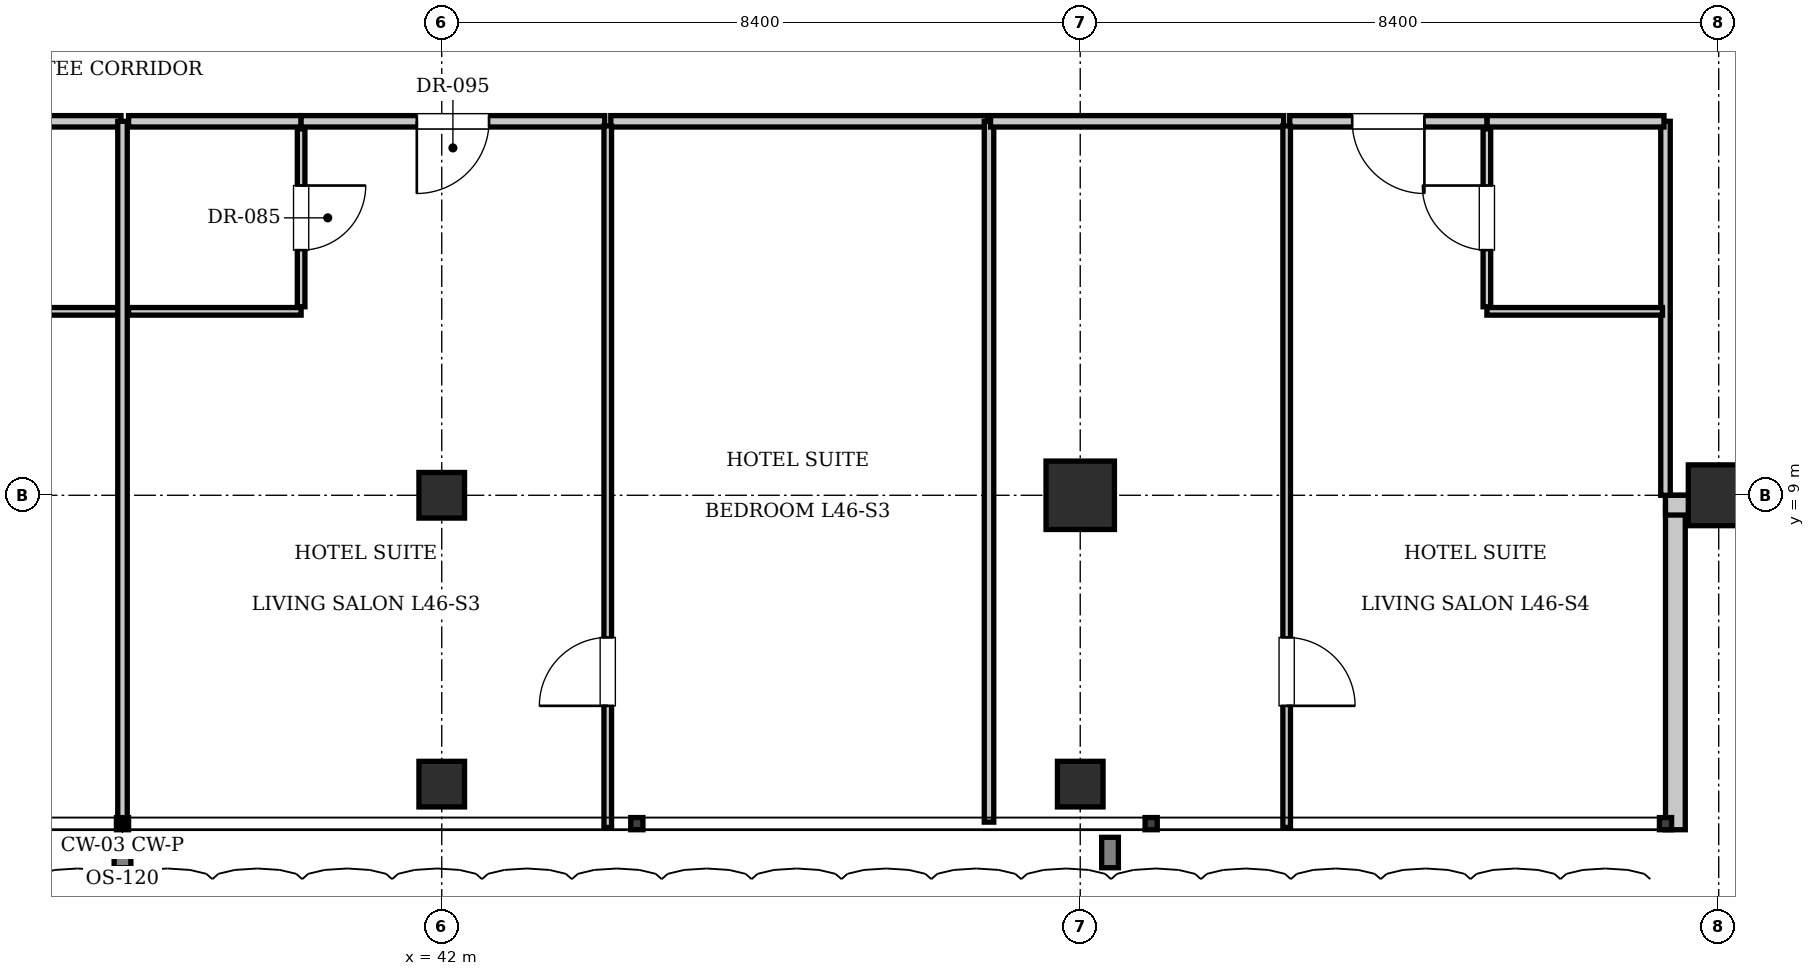
"""IFC4 building model, lengths in metres.
Left out: names, types, materials, properties, quantities, classifications, styles, units other than length and angle.
Written with IfcOpenShell. Run it as: python <this file> out.ifc"""

import sys

from ifc_helpers import new_model, si_unit, direction, frame, frame_2d, origin, origin_2d, place, context, subcontext, project, spatial, rectangle, i_section, extrude, element, fill, save


model = new_model("IFC4")
c1 = context("Model", 3, precision=1e-05, world=origin(), true_north=direction((0.0, 1.0)))
c2 = subcontext(c1, "Body", "Model", "MODEL_VIEW")
j1 = project(units=[si_unit("LENGTHUNIT", "METRE"), si_unit("PLANEANGLEUNIT", "RADIAN")], contexts=[c1])
p1 = place(None, origin())
s1 = spatial("IfcSite", under=j1, at=p1, CompositionType="ELEMENT")
p2 = place(p1, origin())
s2 = spatial("IfcBuilding", under=s1, at=p2, CompositionType="ELEMENT")
p3 = place(p2, frame((0.0, 0.0, 189.0)))
s3 = spatial("IfcBuildingStorey", under=s2, at=p3, CompositionType="ELEMENT", Elevation=189.0)
p4 = place(p3, frame((50.4, 9.0, 0.0), z_axis=(0.0, 0.0, 1.0), x_axis=(1.0, 0.0, 0.0)))
e1 = element("IfcColumn", 1, at=p4, inside=s3, PredefinedType="COLUMN", context=c2, shape_type="SweptSolid", body=[
    extrude(rectangle(XDim=0.9, YDim=0.9, at=origin_2d()), origin(), (0.0, 0.0, 1.0), 3.85),
])
p5 = place(p3, frame((42.0, 9.0, 0.0), z_axis=(0.0, 0.0, 1.0), x_axis=(1.0, 0.0, 0.0)))
e2 = element("IfcColumn", 2, at=p5, inside=s3, PredefinedType="COLUMN", context=c2, shape_type="SweptSolid", body=[
    extrude(i_section(OverallWidth=0.6, OverallDepth=0.6, WebThickness=0.025, FlangeThickness=0.038, at=origin_2d()), origin(), (0.0, 0.0, 1.0), 3.85),
])
p6 = place(p3, frame((58.8, 9.0, 0.0), z_axis=(0.0, 0.0, 1.0), x_axis=(1.0, 0.0, 0.0)))
e3 = element("IfcColumn", 3, at=p6, inside=s3, PredefinedType="COLUMN", context=c2, shape_type="SweptSolid", body=[
    extrude(rectangle(XDim=0.8, YDim=0.8, at=origin_2d()), origin(), (0.0, 0.0, 1.0), 3.85),
])
for number, where, z_axis, x_axis in (
    (4, (42.0, 5.2, 0.0), (0.0, 0.0, 1.0), (1.0, 0.0, 0.0)),
    (5, (50.4, 5.2, 0.0), (0.0, 0.0, 1.0), (1.0, 0.0, 0.0)),
):
    element("IfcColumn", number, at=place(p3, frame(where, z_axis=z_axis, x_axis=x_axis)), inside=s3, PredefinedType="COLUMN", context=c2, shape_type="SweptSolid", body=[
        extrude(i_section(OverallWidth=0.6, OverallDepth=0.6, WebThickness=0.025, FlangeThickness=0.038, at=origin_2d()), origin(), (0.0, 0.0, 1.0), 3.85),
    ])
p7 = place(p3, frame((58.23, 9.0, 0.0), z_axis=(0.0, 0.0, 1.0), x_axis=(0.0, -1.0, 0.0)))
e6 = element("IfcWall", 6, at=p7, inside=s3, PredefinedType="SOLIDWALL", context=c2, shape_type="SweptSolid", body=[
    extrude(rectangle(XDim=4.4, YDim=0.26, at=frame_2d((2.2, 0.0))), origin(), (0.0, 0.0, 1.0), 3.61),
])
p8 = place(p3, frame((62.5, 8.87, 0.0), z_axis=(0.0, 0.0, 1.0), x_axis=(-1.0, 0.0, 0.0)))
e7 = element("IfcWall", 7, at=p8, inside=s3, PredefinedType="SOLIDWALL", context=c2, shape_type="SweptSolid", body=[
    extrude(rectangle(XDim=4.4, YDim=0.26, at=frame_2d((2.2, 0.0))), origin(), (0.0, 0.0, 1.0), 3.007),
])
p9 = place(p3, frame((58.1, 9.0, 0.0), z_axis=(0.0, 0.0, 1.0), x_axis=(0.0, 1.0, 0.0)))
e8 = element("IfcWall", 8, at=p9, inside=s3, PredefinedType="PARTITIONING", context=c2, shape_type="SweptSolid", body=[
    extrude(rectangle(XDim=4.92, YDim=0.125, at=frame_2d((2.46, 0.0))), origin(), (0.0, 0.0, 1.0), 3.61),
])
p10 = place(p3, frame((35.45, 13.92, 0.0), z_axis=(0.0, 0.0, 1.0), x_axis=(1.0, 0.0, 0.0)))
e9 = element("IfcWall", 9, at=p10, inside=s3, PredefinedType="PARTITIONING", context=c2, shape_type="SweptSolid", body=[
    extrude(rectangle(XDim=2.33, YDim=0.15, at=frame_2d((1.165, 0.0))), origin(), (0.0, 0.0, 1.0), 3.61),
])
p11 = place(p3, frame((35.45, 11.42, 0.0), z_axis=(0.0, 0.0, 1.0), x_axis=(1.0, 0.0, 0.0)))
e10 = element("IfcWall", 10, at=p11, inside=s3, PredefinedType="PARTITIONING", context=c2, shape_type="SweptSolid", body=[
    extrude(rectangle(XDim=2.31, YDim=0.1, at=frame_2d((1.155, 0.0))), origin(), (0.0, 0.0, 1.0), 3.61),
])
p12 = place(p3, frame((37.8, 4.7, 0.0), z_axis=(0.0, 0.0, 1.0), x_axis=(0.0, 1.0, 0.0)))
e11 = element("IfcWall", 11, at=p12, inside=s3, PredefinedType="PARTITIONING", context=c2, shape_type="SweptSolid", body=[
    extrude(rectangle(XDim=9.22, YDim=0.125, at=frame_2d((4.61, 0.0))), origin(), (0.0, 0.0, 1.0), 3.293),
])
p13 = place(p3, frame((37.88, 13.92, 0.0), z_axis=(0.0, 0.0, 1.0), x_axis=(1.0, 0.0, 0.0)))
e12 = element("IfcWall", 12, at=p13, inside=s3, PredefinedType="PARTITIONING", context=c2, shape_type="SweptSolid", body=[
    extrude(rectangle(XDim=2.27, YDim=0.15, at=frame_2d((1.135, 0.0))), origin(), (0.0, 0.0, 1.0), 3.61),
])
p14 = place(p3, frame((37.88, 11.42, 0.0), z_axis=(0.0, 0.0, 1.0), x_axis=(1.0, 0.0, 0.0)))
e13 = element("IfcWall", 13, at=p14, inside=s3, PredefinedType="PARTITIONING", context=c2, shape_type="SweptSolid", body=[
    extrude(rectangle(XDim=2.27, YDim=0.1, at=frame_2d((1.135, 0.0))), origin(), (0.0, 0.0, 1.0), 3.61),
])
p15 = place(p3, frame((40.15, 11.48, 0.0), z_axis=(0.0, 0.0, 1.0), x_axis=(0.0, 1.0, 0.0)))
e14 = element("IfcWall", 14, at=p15, inside=s3, PredefinedType="PARTITIONING", context=c2, shape_type="SweptSolid", body=[
    extrude(rectangle(XDim=2.34, YDim=0.1, at=frame_2d((1.17, 0.0))), origin(), (0.0, 0.0, 1.0), 3.61),
])
p16 = place(p15, frame((0.745, 0.0, 0.0)))
e15 = element("IfcOpeningElement", 15, at=p16, cuts=e14, PredefinedType="OPENING", context=c2, shape_type="SweptSolid", body=[
    extrude(rectangle(XDim=0.85, YDim=2.1, at=frame_2d((0.425, 1.05))), frame((0.0, 0.06, 0.0), z_axis=(0.0, -1.0, 0.0), x_axis=(1.0, 0.0, 0.0)), (0.0, 0.0, 1.0), 0.12),
])
p17 = place(p3, frame((40.15, 13.92, 0.0), z_axis=(0.0, 0.0, 1.0), x_axis=(1.0, 0.0, 0.0)))
e16 = element("IfcWall", 16, at=p17, inside=s3, PredefinedType="PARTITIONING", context=c2, shape_type="SweptSolid", body=[
    extrude(rectangle(XDim=3.994, YDim=0.15, at=frame_2d((1.997, 0.0))), origin(), (0.0, 0.0, 1.0), 3.61),
])
p18 = place(p17, frame((1.522, 0.0, 0.0)))
e17 = element("IfcOpeningElement", 17, at=p18, cuts=e16, PredefinedType="OPENING", context=c2, shape_type="SweptSolid", body=[
    extrude(rectangle(XDim=0.95, YDim=2.15, at=frame_2d((0.475, 1.075))), frame((0.0, 0.085, 0.0), z_axis=(0.0, -1.0, 0.0), x_axis=(1.0, 0.0, 0.0)), (0.0, 0.0, 1.0), 0.17),
])
p19 = place(p3, frame((44.224, 13.92, 0.0), z_axis=(0.0, 0.0, 1.0), x_axis=(1.0, 0.0, 0.0)))
e18 = element("IfcWall", 18, at=p19, inside=s3, PredefinedType="PARTITIONING", context=c2, shape_type="SweptSolid", body=[
    extrude(rectangle(XDim=4.956, YDim=0.15, at=frame_2d((2.478, 0.0))), origin(), (0.0, 0.0, 1.0), 3.61),
])
p20 = place(p3, frame((44.184, 4.63, 0.0), z_axis=(0.0, 0.0, 1.0), x_axis=(0.0, 1.0, 0.0)))
e19 = element("IfcWall", 19, at=p20, inside=s3, PredefinedType="PARTITIONING", context=c2, shape_type="SweptSolid", body=[
    extrude(rectangle(XDim=9.23, YDim=0.1, at=frame_2d((4.615, 0.0))), origin(), (0.0, 0.0, 1.0), 3.61),
])
p21 = place(p20, frame((1.6, 0.0, 0.0)))
e20 = element("IfcOpeningElement", 20, at=p21, cuts=e19, PredefinedType="OPENING", context=c2, shape_type="SweptSolid", body=[
    extrude(rectangle(XDim=0.9, YDim=2.1, at=frame_2d((0.45, 1.05))), frame((0.0, 0.06, 0.0), z_axis=(0.0, -1.0, 0.0), x_axis=(1.0, 0.0, 0.0)), (0.0, 0.0, 1.0), 0.12),
])
p22 = place(p3, frame((49.2, 4.7, 0.0), z_axis=(0.0, 0.0, 1.0), x_axis=(0.0, 1.0, 0.0)))
e21 = element("IfcWall", 21, at=p22, inside=s3, PredefinedType="PARTITIONING", context=c2, shape_type="SweptSolid", body=[
    extrude(rectangle(XDim=9.22, YDim=0.125, at=frame_2d((4.61, 0.0))), origin(), (0.0, 0.0, 1.0), 3.61),
])
p23 = place(p3, frame((55.75, 13.92, 0.0), z_axis=(0.0, 0.0, 1.0), x_axis=(1.0, 0.0, 0.0)))
e22 = element("IfcWall", 22, at=p23, inside=s3, PredefinedType="PARTITIONING", context=c2, shape_type="SweptSolid", body=[
    extrude(rectangle(XDim=2.33, YDim=0.15, at=frame_2d((1.165, 0.0))), origin(), (0.0, 0.0, 1.0), 3.61),
])
p24 = place(p3, frame((55.75, 11.42, 0.0), z_axis=(0.0, 0.0, 1.0), x_axis=(1.0, 0.0, 0.0)))
e23 = element("IfcWall", 23, at=p24, inside=s3, PredefinedType="PARTITIONING", context=c2, shape_type="SweptSolid", body=[
    extrude(rectangle(XDim=2.31, YDim=0.1, at=frame_2d((1.155, 0.0))), origin(), (0.0, 0.0, 1.0), 3.61),
])
p25 = place(p3, frame((55.75, 11.48, 0.0), z_axis=(0.0, 0.0, 1.0), x_axis=(0.0, 1.0, 0.0)))
e24 = element("IfcWall", 24, at=p25, inside=s3, PredefinedType="PARTITIONING", context=c2, shape_type="SweptSolid", body=[
    extrude(rectangle(XDim=2.34, YDim=0.1, at=frame_2d((1.17, 0.0))), origin(), (0.0, 0.0, 1.0), 3.61),
])
p26 = place(p25, frame((0.745, 0.0, 0.0)))
e25 = element("IfcOpeningElement", 25, at=p26, cuts=e24, PredefinedType="OPENING", context=c2, shape_type="SweptSolid", body=[
    extrude(rectangle(XDim=0.85, YDim=2.1, at=frame_2d((0.425, 1.05))), frame((0.0, 0.06, 0.0), z_axis=(0.0, -1.0, 0.0), x_axis=(1.0, 0.0, 0.0)), (0.0, 0.0, 1.0), 0.12),
])
p27 = place(p3, frame((49.22, 13.92, 0.0), z_axis=(0.0, 0.0, 1.0), x_axis=(1.0, 0.0, 0.0)))
e26 = element("IfcWall", 26, at=p27, inside=s3, PredefinedType="PARTITIONING", context=c2, shape_type="SweptSolid", body=[
    extrude(rectangle(XDim=3.856, YDim=0.15, at=frame_2d((1.928, 0.0))), origin(), (0.0, 0.0, 1.0), 3.61),
])
p28 = place(p3, frame((53.156, 13.92, 0.0), z_axis=(0.0, 0.0, 1.0), x_axis=(1.0, 0.0, 0.0)))
e27 = element("IfcWall", 27, at=p28, inside=s3, PredefinedType="PARTITIONING", context=c2, shape_type="SweptSolid", body=[
    extrude(rectangle(XDim=2.594, YDim=0.15, at=frame_2d((1.297, 0.0))), origin(), (0.0, 0.0, 1.0), 3.61),
])
p29 = place(p28, frame((0.822, 0.0, 0.0)))
e28 = element("IfcOpeningElement", 28, at=p29, cuts=e27, PredefinedType="OPENING", context=c2, shape_type="SweptSolid", body=[
    extrude(rectangle(XDim=0.95, YDim=2.15, at=frame_2d((0.475, 1.075))), frame((0.0, 0.085, 0.0), z_axis=(0.0, -1.0, 0.0), x_axis=(1.0, 0.0, 0.0)), (0.0, 0.0, 1.0), 0.17),
])
p30 = place(p3, frame((53.116, 4.63, 0.0), z_axis=(0.0, 0.0, 1.0), x_axis=(0.0, 1.0, 0.0)))
e29 = element("IfcWall", 29, at=p30, inside=s3, PredefinedType="PARTITIONING", context=c2, shape_type="SweptSolid", body=[
    extrude(rectangle(XDim=9.23, YDim=0.1, at=frame_2d((4.615, 0.0))), origin(), (0.0, 0.0, 1.0), 3.61),
])
p31 = place(p30, frame((1.6, 0.0, 0.0)))
e30 = element("IfcOpeningElement", 30, at=p31, cuts=e29, PredefinedType="OPENING", context=c2, shape_type="SweptSolid", body=[
    extrude(rectangle(XDim=0.9, YDim=2.1, at=frame_2d((0.45, 1.05))), frame((0.0, 0.06, 0.0), z_axis=(0.0, -1.0, 0.0), x_axis=(1.0, 0.0, 0.0)), (0.0, 0.0, 1.0), 0.12),
])
p32 = place(p16, frame((0.85, 0.0, 0.0), z_axis=(0.0, 0.0, 1.0), x_axis=(-1.0, 0.0, 0.0)))
e31 = element("IfcDoor", 31, at=p32, inside=s3, OperationType="SINGLE_SWING_LEFT", PredefinedType="DOOR", context=c2, shape_type="SweptSolid", body=[
    extrude(rectangle(XDim=0.85, YDim=2.1, at=frame_2d((0.425, 1.05))), frame((0.0, 0.025, 0.0), z_axis=(0.0, -1.0, 0.0), x_axis=(1.0, 0.0, 0.0)), (0.0, 0.0, 1.0), 0.05),
])
fill(e15, e31)
p33 = place(p18, frame((0.95, 0.0, 0.0), z_axis=(0.0, 0.0, 1.0), x_axis=(-1.0, 0.0, 0.0)))
e32 = element("IfcDoor", 32, at=p33, inside=s3, OperationType="SINGLE_SWING_RIGHT", PredefinedType="DOOR", context=c2, shape_type="SweptSolid", body=[
    extrude(rectangle(XDim=0.95, YDim=2.15, at=frame_2d((0.475, 1.075))), frame((0.0, 0.025, 0.0), z_axis=(0.0, -1.0, 0.0), x_axis=(1.0, 0.0, 0.0)), (0.0, 0.0, 1.0), 0.05),
])
fill(e17, e32)
p34 = place(p21, origin())
e33 = element("IfcDoor", 33, at=p34, inside=s3, OperationType="SINGLE_SWING_LEFT", PredefinedType="DOOR", context=c2, shape_type="SweptSolid", body=[
    extrude(rectangle(XDim=0.9, YDim=2.1, at=frame_2d((0.45, 1.05))), frame((0.0, 0.025, 0.0), z_axis=(0.0, -1.0, 0.0), x_axis=(1.0, 0.0, 0.0)), (0.0, 0.0, 1.0), 0.05),
])
fill(e20, e33)
p35 = place(p26, origin())
e34 = element("IfcDoor", 34, at=p35, inside=s3, OperationType="SINGLE_SWING_RIGHT", PredefinedType="DOOR", context=c2, shape_type="SweptSolid", body=[
    extrude(rectangle(XDim=0.85, YDim=2.1, at=frame_2d((0.425, 1.05))), frame((0.0, 0.025, 0.0), z_axis=(0.0, -1.0, 0.0), x_axis=(1.0, 0.0, 0.0)), (0.0, 0.0, 1.0), 0.05),
])
fill(e25, e34)
p36 = place(p29, frame((0.95, 0.0, 0.0), z_axis=(0.0, 0.0, 1.0), x_axis=(-1.0, 0.0, 0.0)))
e35 = element("IfcDoor", 35, at=p36, inside=s3, OperationType="SINGLE_SWING_LEFT", PredefinedType="DOOR", context=c2, shape_type="SweptSolid", body=[
    extrude(rectangle(XDim=0.95, YDim=2.15, at=frame_2d((0.475, 1.075))), frame((0.0, 0.025, 0.0), z_axis=(0.0, -1.0, 0.0), x_axis=(1.0, 0.0, 0.0)), (0.0, 0.0, 1.0), 0.05),
])
fill(e28, e35)
p37 = place(p31, frame((0.9, 0.0, 0.0), z_axis=(0.0, 0.0, 1.0), x_axis=(-1.0, 0.0, 0.0)))
e36 = element("IfcDoor", 36, at=p37, inside=s3, OperationType="SINGLE_SWING_RIGHT", PredefinedType="DOOR", context=c2, shape_type="SweptSolid", body=[
    extrude(rectangle(XDim=0.9, YDim=2.1, at=frame_2d((0.45, 1.05))), frame((0.0, 0.025, 0.0), z_axis=(0.0, -1.0, 0.0), x_axis=(1.0, 0.0, 0.0)), (0.0, 0.0, 1.0), 0.05),
])
fill(e30, e36)
save(model, sys.argv[1])
